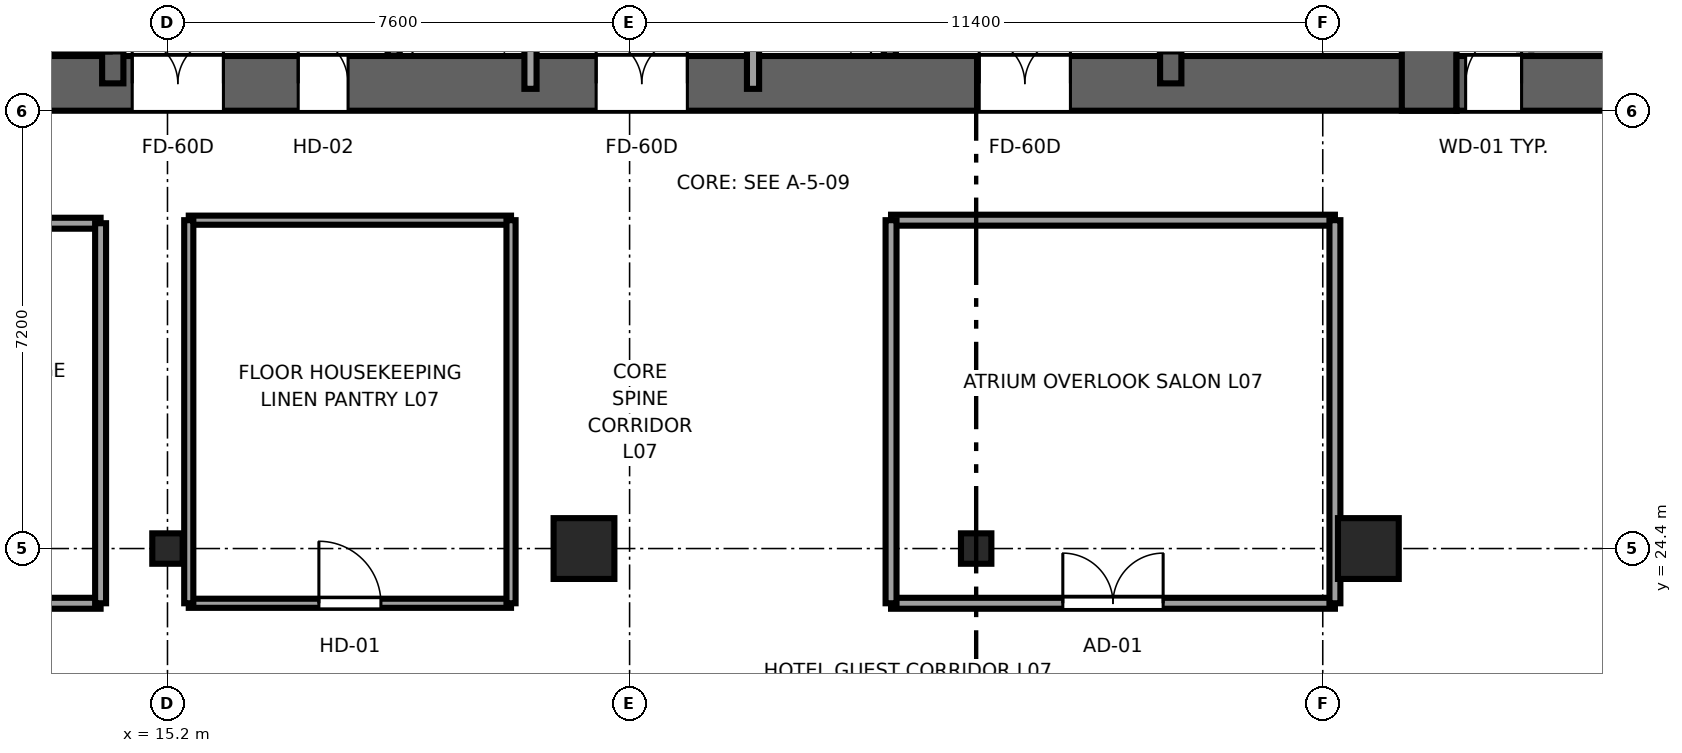
"""IFC4 building model, lengths in metres.
Left out: names, types, materials, properties, quantities, classifications, styles, units other than length and angle.
Written with IfcOpenShell. Run it as: python <this file> out.ifc"""

import sys

from ifc_helpers import new_model, si_unit, direction, frame, frame_2d, origin, origin_2d, place, context, subcontext, project, spatial, rectangle, i_section, extrude, source, transform, mapped, element, fill, save


model = new_model("IFC4")
c1 = context("Model", 3, precision=1e-05, world=origin(), true_north=direction((0.0, 1.0)))
c2 = subcontext(c1, "Body", "Model", "MODEL_VIEW")
j1 = project(units=[si_unit("LENGTHUNIT", "METRE"), si_unit("PLANEANGLEUNIT", "RADIAN")], contexts=[c1])
p1 = place(None, origin())
s1 = spatial("IfcSite", under=j1, at=p1, CompositionType="ELEMENT")
p2 = place(p1, origin())
s2 = spatial("IfcBuilding", under=s1, at=p2, CompositionType="ELEMENT")
p3 = place(p2, frame((0.0, 0.0, 35.55)))
s3 = spatial("IfcBuildingStorey", under=s2, at=p3, CompositionType="ELEMENT", Elevation=35.55)
p4 = place(p3, frame((9.6, 32.05, 0.0), z_axis=(0.0, 0.0, 1.0), x_axis=(1.0, 0.0, 0.0)))
e1 = element("IfcWall", 1, at=p4, inside=s3, PredefinedType="SHEAR", context=c2, shape_type="SweptSolid", body=[
    extrude(rectangle(XDim=26.8, YDim=0.9, at=frame_2d((13.4, 0.0))), origin(), (0.0, 0.0, 1.0), 3.55),
])
p5 = place(p4, frame((6.52, 0.0, 0.0), z_axis=(0.0, 0.0, 1.0), x_axis=(-1.0, 0.0, 0.0)))
e2 = element("IfcOpeningElement", 2, at=p5, cuts=e1, PredefinedType="OPENING", context=c2, shape_type="SweptSolid", body=[
    extrude(rectangle(XDim=1.5, YDim=2.04, at=frame_2d((0.75, 1.02))), frame((0.0, 0.46, 0.0), z_axis=(0.0, -1.0, 0.0), x_axis=(1.0, 0.0, 0.0)), (0.0, 0.0, 1.0), 0.92),
])
p6 = place(p4, frame((14.15, 0.0, 0.0), z_axis=(0.0, 0.0, 1.0), x_axis=(-1.0, 0.0, 0.0)))
e3 = element("IfcOpeningElement", 3, at=p6, cuts=e1, PredefinedType="OPENING", context=c2, shape_type="SweptSolid", body=[
    extrude(rectangle(XDim=1.5, YDim=2.04, at=frame_2d((0.75, 1.02))), frame((0.0, 0.46, 0.0), z_axis=(0.0, -1.0, 0.0), x_axis=(1.0, 0.0, 0.0)), (0.0, 0.0, 1.0), 0.92),
])
p7 = place(p4, frame((20.45, 0.0, 0.0), z_axis=(0.0, 0.0, 1.0), x_axis=(-1.0, 0.0, 0.0)))
e4 = element("IfcOpeningElement", 4, at=p7, cuts=e1, PredefinedType="OPENING", context=c2, shape_type="SweptSolid", body=[
    extrude(rectangle(XDim=1.5, YDim=2.04, at=frame_2d((0.75, 1.02))), frame((0.0, 0.46, 0.0), z_axis=(0.0, -1.0, 0.0), x_axis=(1.0, 0.0, 0.0)), (0.0, 0.0, 1.0), 0.92),
])
p8 = place(p4, frame((8.57, 0.0, 0.0), z_axis=(0.0, 0.0, 1.0), x_axis=(-1.0, 0.0, 0.0)))
e5 = element("IfcOpeningElement", 5, at=p8, cuts=e1, PredefinedType="OPENING", context=c2, shape_type="SweptSolid", body=[
    extrude(rectangle(XDim=0.82, YDim=2.01, at=frame_2d((0.41, 1.005))), frame((0.0, 0.46, 0.0), z_axis=(0.0, -1.0, 0.0), x_axis=(1.0, 0.0, 0.0)), (0.0, 0.0, 1.0), 0.92),
])
p9 = place(p3, frame((35.95, 31.6, 0.0), z_axis=(0.0, 0.0, 1.0), x_axis=(0.0, 1.0, 0.0)))
e6 = element("IfcWall", 6, at=p9, inside=s3, PredefinedType="SHEAR", context=c2, shape_type="SweptSolid", body=[
    extrude(rectangle(XDim=13.6, YDim=0.9, at=frame_2d((6.8, 0.0))), origin(), (0.0, 0.0, 1.0), 3.55),
])
p10 = place(p3, frame((14.3, 32.05, 0.0), z_axis=(0.0, 0.0, 1.0), x_axis=(0.0, 1.0, 0.0)))
e7 = element("IfcWall", 7, at=p10, inside=s3, PredefinedType="SHEAR", context=c2, shape_type="SweptSolid", body=[
    extrude(rectangle(XDim=12.7, YDim=0.35, at=frame_2d((6.35, 0.0))), origin(), (0.0, 0.0, 1.0), 3.55),
])
p11 = place(p10, frame((0.5, 0.0, 0.0)))
e8 = element("IfcOpeningElement", 8, at=p11, cuts=e7, PredefinedType="OPENING", context=c2, shape_type="SweptSolid", body=[
    extrude(rectangle(XDim=1.1, YDim=2.12, at=frame_2d((0.55, 1.06))), frame((0.0, 0.185, 0.0), z_axis=(0.0, -1.0, 0.0), x_axis=(1.0, 0.0, 0.0)), (0.0, 0.0, 1.0), 0.37),
])
p12 = place(p3, frame((31.7, 32.05, 0.0), z_axis=(0.0, 0.0, 1.0), x_axis=(0.0, 1.0, 0.0)))
e9 = element("IfcWall", 9, at=p12, inside=s3, PredefinedType="SHEAR", context=c2, shape_type="SweptSolid", body=[
    extrude(rectangle(XDim=12.7, YDim=0.35, at=frame_2d((6.35, 0.0))), origin(), (0.0, 0.0, 1.0), 3.55),
])
p13 = place(p12, frame((1.6, 0.0, 0.0), z_axis=(0.0, 0.0, 1.0), x_axis=(-1.0, 0.0, 0.0)))
e10 = element("IfcOpeningElement", 10, at=p13, cuts=e9, PredefinedType="OPENING", context=c2, shape_type="SweptSolid", body=[
    extrude(rectangle(XDim=1.1, YDim=2.12, at=frame_2d((0.55, 1.06))), frame((0.0, 0.185, 0.0), z_axis=(0.0, -1.0, 0.0), x_axis=(1.0, 0.0, 0.0)), (0.0, 0.0, 1.0), 0.37),
])
p14 = place(p3, frame((36.4, 32.05, 0.0), z_axis=(0.0, 0.0, 1.0), x_axis=(1.0, 0.0, 0.0)))
e11 = element("IfcWall", 11, at=p14, inside=s3, PredefinedType="SHEAR", context=c2, shape_type="SweptSolid", body=[
    extrude(rectangle(XDim=4.0, YDim=0.9, at=frame_2d((2.0, 0.0))), origin(), (0.0, 0.0, 1.0), 3.55),
])
p15 = place(p14, frame((1.07, 0.0, 0.0), z_axis=(0.0, 0.0, 1.0), x_axis=(-1.0, 0.0, 0.0)))
e12 = element("IfcOpeningElement", 12, at=p15, cuts=e11, PredefinedType="OPENING", context=c2, shape_type="SweptSolid", body=[
    extrude(rectangle(XDim=0.92, YDim=2.01, at=frame_2d((0.46, 1.005))), frame((0.0, 0.46, 0.0), z_axis=(0.0, -1.0, 0.0), x_axis=(1.0, 0.0, 0.0)), (0.0, 0.0, 1.0), 0.92),
])
m1 = source(origin(), c2, "Body", "SweptSolid", [
    extrude(i_section(OverallWidth=0.5, OverallDepth=0.5, WebThickness=0.028, FlangeThickness=0.045, at=origin_2d()), origin(), (0.0, 0.0, 1.0), 3.55),
])
p16 = place(p3, frame((15.2, 24.4, 0.0), z_axis=(0.0, 0.0, 1.0), x_axis=(1.0, 0.0, 0.0)))
e13 = element("IfcColumn", 13, at=p16, inside=s3, PredefinedType="COLUMN", context=c2, shape_type="MappedRepresentation", body=[
    mapped(m1, transform((0.0, 0.0, 0.0), x_axis=(1.0, 0.0, 0.0), y_axis=(0.0, 1.0, 0.0), z_axis=(0.0, 0.0, 1.0), scale=1.0)),
])
m2 = source(origin(), c2, "Body", "SweptSolid", [
    extrude(rectangle(XDim=1.0, YDim=1.0, at=origin_2d()), origin(), (0.0, 0.0, 1.0), 3.55),
])
for number, where, z_axis, x_axis in (
    (14, (22.05, 24.4, 0.0), (0.0, 0.0, 1.0), (1.0, 0.0, 0.0)),
    (15, (34.95, 24.4, 0.0), (0.0, 0.0, 1.0), (1.0, 0.0, 0.0)),
):
    element("IfcColumn", number, at=place(p3, frame(where, z_axis=z_axis, x_axis=x_axis)), inside=s3, PredefinedType="COLUMN", context=c2, shape_type="MappedRepresentation", body=[
        mapped(m2, transform((0.0, 0.0, 0.0), x_axis=(1.0, 0.0, 0.0), y_axis=(0.0, 1.0, 0.0), z_axis=(0.0, 0.0, 1.0), scale=1.0)),
    ])
p17 = place(p3, frame((28.5, 24.4, 0.0), z_axis=(0.0, 0.0, 1.0), x_axis=(1.0, 0.0, 0.0)))
e16 = element("IfcColumn", 16, at=p17, inside=s3, PredefinedType="COLUMN", context=c2, shape_type="MappedRepresentation", body=[
    mapped(m1, transform((0.0, 0.0, 0.0), x_axis=(1.0, 0.0, 0.0), y_axis=(0.0, 1.0, 0.0), z_axis=(0.0, 0.0, 1.0), scale=1.0)),
])
for number, where, z_axis, x_axis in (
    (17, (18.92, 32.504, 0.0), (0.0, 0.0, 1.0), (0.0, 1.0, 0.0)),
    (18, (27.08, 32.504, 0.0), (0.0, 0.0, 1.0), (0.0, 1.0, 0.0)),
):
    element("IfcWall", number, at=place(p3, frame(where, z_axis=z_axis, x_axis=x_axis)), inside=s3, PredefinedType="SOLIDWALL", context=c2, shape_type="SweptSolid", body=[
        extrude(rectangle(XDim=3.646, YDim=0.2, at=frame_2d((1.823, 0.0))), origin(), (0.0, 0.0, 1.0), 3.37),
    ])
for number, where, z_axis, x_axis in (
    (19, (21.17, 31.96, 0.0), (0.0, 0.0, 1.0), (0.0, 1.0, 0.0)),
    (20, (24.83, 31.96, 0.0), (0.0, 0.0, 1.0), (0.0, 1.0, 0.0)),
):
    element("IfcWall", number, at=place(p3, frame(where, z_axis=z_axis, x_axis=x_axis)), inside=s3, PredefinedType="SOLIDWALL", context=c2, shape_type="SweptSolid", body=[
        extrude(rectangle(XDim=12.58, YDim=0.2, at=frame_2d((6.29, 0.0))), origin(), (0.0, 0.0, 1.0), 3.37),
    ])
p18 = place(p3, frame((9.88, 23.5, 0.0), z_axis=(0.0, 0.0, 1.0), x_axis=(1.0, 0.0, 0.0)))
e21 = element("IfcWall", 21, at=p18, inside=s3, PredefinedType="PARTITIONING", context=c2, shape_type="SweptSolid", body=[
    extrude(rectangle(XDim=4.22, YDim=0.18, at=frame_2d((2.11, 0.0))), origin(), (0.0, 0.0, 1.0), 3.37),
])
p19 = place(p18, frame((1.285, 0.0, 0.0)))
e22 = element("IfcOpeningElement", 22, at=p19, cuts=e21, PredefinedType="OPENING", context=c2, shape_type="SweptSolid", body=[
    extrude(rectangle(XDim=1.65, YDim=2.15, at=frame_2d((0.825, 1.075))), frame((0.0, 0.1, 0.0), z_axis=(0.0, -1.0, 0.0), x_axis=(1.0, 0.0, 0.0)), (0.0, 0.0, 1.0), 0.2),
])
p20 = place(p3, frame((9.88, 29.75, 0.0), z_axis=(0.0, 0.0, 1.0), x_axis=(1.0, 0.0, 0.0)))
e23 = element("IfcWall", 23, at=p20, inside=s3, PredefinedType="PARTITIONING", context=c2, shape_type="SweptSolid", body=[
    extrude(rectangle(XDim=4.22, YDim=0.18, at=frame_2d((2.11, 0.0))), origin(), (0.0, 0.0, 1.0), 3.37),
])
p21 = place(p3, frame((14.1, 23.5, 0.0), z_axis=(0.0, 0.0, 1.0), x_axis=(0.0, 1.0, 0.0)))
e24 = element("IfcWall", 24, at=p21, inside=s3, PredefinedType="PARTITIONING", context=c2, shape_type="SweptSolid", body=[
    extrude(rectangle(XDim=6.25, YDim=0.18, at=frame_2d((3.125, 0.0))), origin(), (0.0, 0.0, 1.0), 3.37),
])
p22 = place(p3, frame((27.1, 23.5, 0.0), z_axis=(0.0, 0.0, 1.0), x_axis=(1.0, 0.0, 0.0)))
e25 = element("IfcWall", 25, at=p22, inside=s3, PredefinedType="PARTITIONING", context=c2, shape_type="SweptSolid", body=[
    extrude(rectangle(XDim=7.3, YDim=0.18, at=frame_2d((3.65, 0.0))), origin(), (0.0, 0.0, 1.0), 3.37),
])
p23 = place(p22, frame((2.825, 0.0, 0.0)))
e26 = element("IfcOpeningElement", 26, at=p23, cuts=e25, PredefinedType="OPENING", context=c2, shape_type="SweptSolid", body=[
    extrude(rectangle(XDim=1.65, YDim=2.15, at=frame_2d((0.825, 1.075))), frame((0.0, 0.1, 0.0), z_axis=(0.0, -1.0, 0.0), x_axis=(1.0, 0.0, 0.0)), (0.0, 0.0, 1.0), 0.2),
])
p24 = place(p3, frame((27.1, 29.8, 0.0), z_axis=(0.0, 0.0, 1.0), x_axis=(1.0, 0.0, 0.0)))
e27 = element("IfcWall", 27, at=p24, inside=s3, PredefinedType="PARTITIONING", context=c2, shape_type="SweptSolid", body=[
    extrude(rectangle(XDim=7.3, YDim=0.18, at=frame_2d((3.65, 0.0))), origin(), (0.0, 0.0, 1.0), 3.37),
])
for number, where, z_axis, x_axis in (
    (28, (27.1, 23.5, 0.0), (0.0, 0.0, 1.0), (0.0, 1.0, 0.0)),
    (29, (34.4, 23.5, 0.0), (0.0, 0.0, 1.0), (0.0, 1.0, 0.0)),
):
    element("IfcWall", number, at=place(p3, frame(where, z_axis=z_axis, x_axis=x_axis)), inside=s3, PredefinedType="PARTITIONING", context=c2, shape_type="SweptSolid", body=[
        extrude(rectangle(XDim=6.3, YDim=0.18, at=frame_2d((3.15, 0.0))), origin(), (0.0, 0.0, 1.0), 3.37),
    ])
p25 = place(p3, frame((15.55, 23.5, 0.0), z_axis=(0.0, 0.0, 1.0), x_axis=(1.0, 0.0, 0.0)))
e30 = element("IfcWall", 30, at=p25, inside=s3, PredefinedType="PARTITIONING", context=c2, shape_type="SweptSolid", body=[
    extrude(rectangle(XDim=5.3, YDim=0.15, at=frame_2d((2.65, 0.0))), origin(), (0.0, 0.0, 1.0), 3.37),
])
p26 = place(p25, frame((2.14, 0.0, 0.0)))
e31 = element("IfcOpeningElement", 31, at=p26, cuts=e30, PredefinedType="OPENING", context=c2, shape_type="SweptSolid", body=[
    extrude(rectangle(XDim=1.02, YDim=2.03, at=frame_2d((0.51, 1.015))), frame((0.0, 0.085, 0.0), z_axis=(0.0, -1.0, 0.0), x_axis=(1.0, 0.0, 0.0)), (0.0, 0.0, 1.0), 0.17),
])
p27 = place(p3, frame((15.55, 29.8, 0.0), z_axis=(0.0, 0.0, 1.0), x_axis=(1.0, 0.0, 0.0)))
e32 = element("IfcWall", 32, at=p27, inside=s3, PredefinedType="PARTITIONING", context=c2, shape_type="SweptSolid", body=[
    extrude(rectangle(XDim=5.3, YDim=0.15, at=frame_2d((2.65, 0.0))), origin(), (0.0, 0.0, 1.0), 3.37),
])
for number, where, z_axis, x_axis in (
    (33, (15.55, 23.5, 0.0), (0.0, 0.0, 1.0), (0.0, 1.0, 0.0)),
    (34, (20.85, 23.5, 0.0), (0.0, 0.0, 1.0), (0.0, 1.0, 0.0)),
):
    element("IfcWall", number, at=place(p3, frame(where, z_axis=z_axis, x_axis=x_axis)), inside=s3, PredefinedType="PARTITIONING", context=c2, shape_type="SweptSolid", body=[
        extrude(rectangle(XDim=6.3, YDim=0.15, at=frame_2d((3.15, 0.0))), origin(), (0.0, 0.0, 1.0), 3.37),
    ])
m3 = source(origin(), c2, "Body", "SweptSolid", [
    extrude(rectangle(XDim=1.1, YDim=2.12, at=frame_2d((0.55, 1.06))), frame((0.0, 0.025, 0.0), z_axis=(0.0, -1.0, 0.0), x_axis=(1.0, 0.0, 0.0)), (0.0, 0.0, 1.0), 0.05),
])
p28 = place(p11, origin())
e35 = element("IfcDoor", 35, at=p28, inside=s3, OperationType="SINGLE_SWING_LEFT", PredefinedType="DOOR", context=c2, shape_type="MappedRepresentation", body=[
    mapped(m3, transform((0.0, 0.0, 0.0), x_axis=(1.0, 0.0, 0.0), y_axis=(0.0, 1.0, 0.0), z_axis=(0.0, 0.0, 1.0), scale=1.0)),
])
fill(e8, e35)
p29 = place(p13, origin())
e36 = element("IfcDoor", 36, at=p29, inside=s3, OperationType="SINGLE_SWING_RIGHT", PredefinedType="DOOR", context=c2, shape_type="MappedRepresentation", body=[
    mapped(m3, transform((0.0, 0.0, 0.0), x_axis=(1.0, 0.0, 0.0), y_axis=(0.0, 1.0, 0.0), z_axis=(0.0, 0.0, 1.0), scale=1.0)),
])
fill(e10, e36)
m4 = source(origin(), c2, "Body", "SweptSolid", [
    extrude(rectangle(XDim=1.5, YDim=2.04, at=frame_2d((0.75, 1.02))), frame((0.0, 0.025, 0.0), z_axis=(0.0, -1.0, 0.0), x_axis=(1.0, 0.0, 0.0)), (0.0, 0.0, 1.0), 0.05),
])
p30 = place(p5, origin())
e37 = element("IfcDoor", 37, at=p30, inside=s3, OperationType="DOUBLE_DOOR_SINGLE_SWING", PredefinedType="DOOR", context=c2, shape_type="MappedRepresentation", body=[
    mapped(m4, transform((0.0, 0.0, 0.0), x_axis=(1.0, 0.0, 0.0), y_axis=(0.0, 1.0, 0.0), z_axis=(0.0, 0.0, 1.0), scale=1.0)),
])
fill(e2, e37)
p31 = place(p6, origin())
e38 = element("IfcDoor", 38, at=p31, inside=s3, OperationType="DOUBLE_DOOR_SINGLE_SWING", PredefinedType="DOOR", context=c2, shape_type="MappedRepresentation", body=[
    mapped(m4, transform((0.0, 0.0, 0.0), x_axis=(1.0, 0.0, 0.0), y_axis=(0.0, 1.0, 0.0), z_axis=(0.0, 0.0, 1.0), scale=1.0)),
])
fill(e3, e38)
p32 = place(p7, origin())
e39 = element("IfcDoor", 39, at=p32, inside=s3, OperationType="DOUBLE_DOOR_SINGLE_SWING", PredefinedType="DOOR", context=c2, shape_type="MappedRepresentation", body=[
    mapped(m4, transform((0.0, 0.0, 0.0), x_axis=(1.0, 0.0, 0.0), y_axis=(0.0, 1.0, 0.0), z_axis=(0.0, 0.0, 1.0), scale=1.0)),
])
fill(e4, e39)
m5 = source(origin(), c2, "Body", "SweptSolid", [
    extrude(rectangle(XDim=0.82, YDim=2.01, at=frame_2d((0.41, 1.005))), frame((0.0, 0.025, 0.0), z_axis=(0.0, -1.0, 0.0), x_axis=(1.0, 0.0, 0.0)), (0.0, 0.0, 1.0), 0.05),
])
p33 = place(p8, origin())
e40 = element("IfcDoor", 40, at=p33, inside=s3, OperationType="SINGLE_SWING_LEFT", PredefinedType="DOOR", context=c2, shape_type="MappedRepresentation", body=[
    mapped(m5, transform((0.0, 0.0, 0.0), x_axis=(1.0, 0.0, 0.0), y_axis=(0.0, 1.0, 0.0), z_axis=(0.0, 0.0, 1.0), scale=1.0)),
])
fill(e5, e40)
m6 = source(origin(), c2, "Body", "SweptSolid", [
    extrude(rectangle(XDim=0.92, YDim=2.01, at=frame_2d((0.46, 1.005))), frame((0.0, 0.025, 0.0), z_axis=(0.0, -1.0, 0.0), x_axis=(1.0, 0.0, 0.0)), (0.0, 0.0, 1.0), 0.05),
])
p34 = place(p15, origin())
e41 = element("IfcDoor", 41, at=p34, inside=s3, OperationType="SINGLE_SWING_RIGHT", PredefinedType="DOOR", context=c2, shape_type="MappedRepresentation", body=[
    mapped(m6, transform((0.0, 0.0, 0.0), x_axis=(1.0, 0.0, 0.0), y_axis=(0.0, 1.0, 0.0), z_axis=(0.0, 0.0, 1.0), scale=1.0)),
])
fill(e12, e41)
m7 = source(origin(), c2, "Body", "SweptSolid", [
    extrude(rectangle(XDim=1.65, YDim=2.15, at=frame_2d((0.825, 1.075))), frame((0.0, 0.025, 0.0), z_axis=(0.0, -1.0, 0.0), x_axis=(1.0, 0.0, 0.0)), (0.0, 0.0, 1.0), 0.05),
])
p35 = place(p23, origin())
e42 = element("IfcDoor", 42, at=p35, inside=s3, OperationType="DOUBLE_DOOR_SINGLE_SWING", PredefinedType="DOOR", context=c2, shape_type="MappedRepresentation", body=[
    mapped(m7, transform((0.0, 0.0, 0.0), x_axis=(1.0, 0.0, 0.0), y_axis=(0.0, 1.0, 0.0), z_axis=(0.0, 0.0, 1.0), scale=1.0)),
])
fill(e26, e42)
m8 = source(origin(), c2, "Body", "SweptSolid", [
    extrude(rectangle(XDim=1.02, YDim=2.03, at=frame_2d((0.51, 1.015))), frame((0.0, 0.025, 0.0), z_axis=(0.0, -1.0, 0.0), x_axis=(1.0, 0.0, 0.0)), (0.0, 0.0, 1.0), 0.05),
])
p36 = place(p26, origin())
e43 = element("IfcDoor", 43, at=p36, inside=s3, OperationType="SINGLE_SWING_LEFT", PredefinedType="DOOR", context=c2, shape_type="MappedRepresentation", body=[
    mapped(m8, transform((0.0, 0.0, 0.0), x_axis=(1.0, 0.0, 0.0), y_axis=(0.0, 1.0, 0.0), z_axis=(0.0, 0.0, 1.0), scale=1.0)),
])
fill(e31, e43)
save(model, sys.argv[1])
